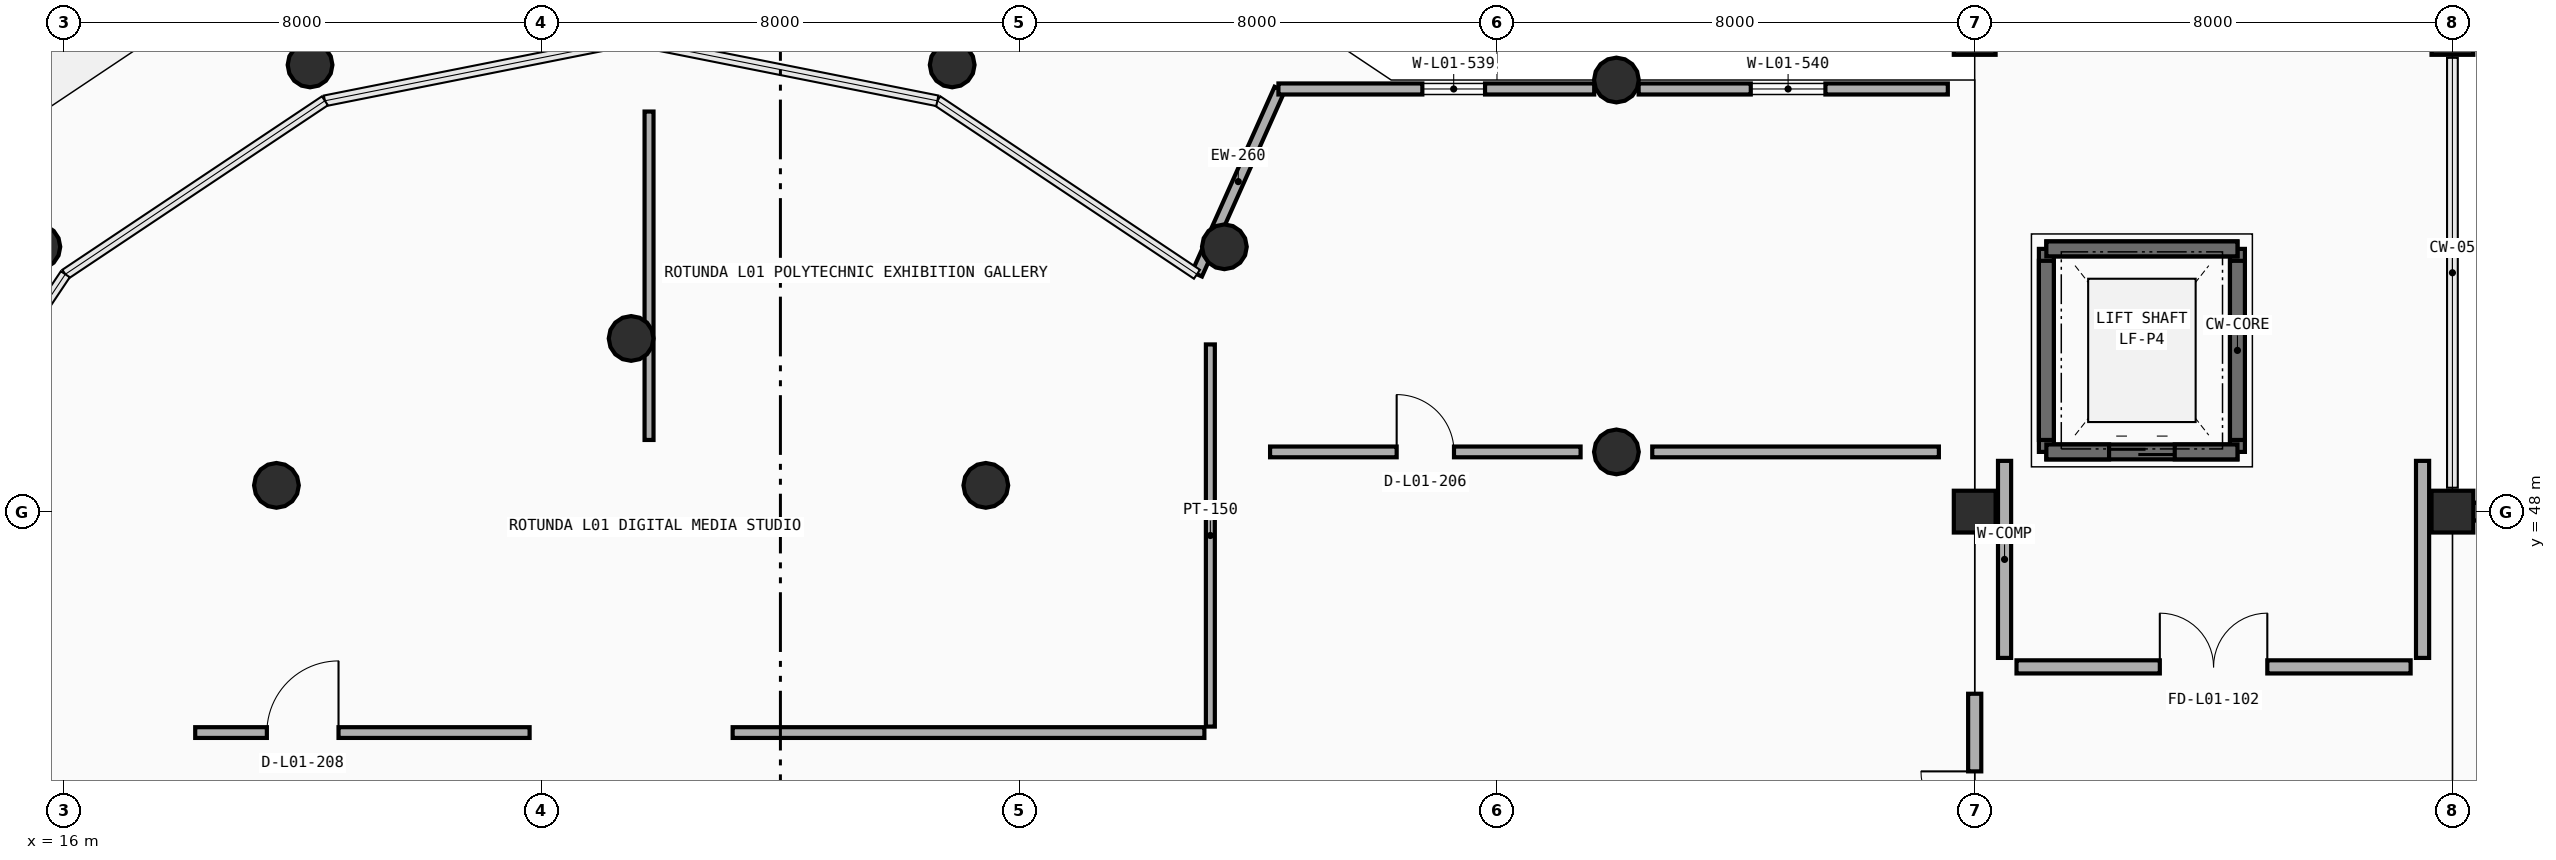
"""IFC4 building model, lengths in metres.
Left out: names, types, materials, properties, quantities, classifications, styles, units other than length and angle.
Written with IfcOpenShell. Run it as: python <this file> out.ifc"""

import sys

from ifc_helpers import new_model, si_unit, direction, frame, frame_2d, origin, origin_2d, place, context, subcontext, project, spatial, rectangle, circle, extrude, element, fill, save


model = new_model("IFC4")
c1 = context("Model", 3, precision=1e-05, world=origin(), true_north=direction((0.0, 1.0)))
c2 = subcontext(c1, "Body", "Model", "MODEL_VIEW")
j1 = project(units=[si_unit("LENGTHUNIT", "METRE"), si_unit("PLANEANGLEUNIT", "RADIAN")], contexts=[c1])
p1 = place(None, origin())
s1 = spatial("IfcSite", under=j1, at=p1, CompositionType="ELEMENT")
p2 = place(p1, origin())
s2 = spatial("IfcBuilding", under=s1, at=p2, CompositionType="ELEMENT")
p3 = place(p2, origin())
s3 = spatial("IfcBuildingStorey", under=s2, at=p3, CompositionType="ELEMENT", Elevation=0.0)
for number, where, z_axis, x_axis in (
    (1, (48.0, 48.0, 0.0), (0.0, 0.0, 1.0), (1.0, 0.0, 0.0)),
    (2, (56.0, 48.0, 0.0), (0.0, 0.0, 1.0), (1.0, 0.0, 0.0)),
):
    element("IfcColumn", number, at=place(p3, frame(where, z_axis=z_axis, x_axis=x_axis)), inside=s3, PredefinedType="COLUMN", context=c2, shape_type="SweptSolid", body=[
        extrude(rectangle(XDim=0.7, YDim=0.7, at=origin_2d()), origin(), (0.0, 0.0, 1.0), 4.8),
    ])
for number, where, z_axis, x_axis in (
    (3, (19.56, 48.44, 0.0), (0.0, 0.0, 1.0), (1.0, 0.0, 0.0)),
    (4, (31.44, 48.44, 0.0), (0.0, 0.0, 1.0), (1.0, 0.0, 0.0)),
    (5, (42.0, 49.0, 0.0), (0.0, 0.0, 1.0), (1.0, 0.0, 0.0)),
    (6, (25.5, 50.9, 0.0), (0.0, 0.0, 1.0), (1.0, 0.0, 0.0)),
    (7, (15.565, 52.435, 0.0), (0.0, 0.0, 1.0), (1.0, 0.0, 0.0)),
    (8, (35.435, 52.435, 0.0), (0.0, 0.0, 1.0), (1.0, 0.0, 0.0)),
    (9, (42.0, 55.228, 0.0), (0.0, 0.0, 1.0), (1.0, 0.0, 0.0)),
    (10, (20.123, 55.48, 0.0), (0.0, 0.0, 1.0), (1.0, 0.0, 0.0)),
    (11, (30.877, 55.48, 0.0), (0.0, 0.0, 1.0), (1.0, 0.0, 0.0)),
):
    element("IfcColumn", number, at=place(p3, frame(where, z_axis=z_axis, x_axis=x_axis)), inside=s3, PredefinedType="COLUMN", context=c2, shape_type="SweptSolid", body=[
        extrude(circle(Radius=0.375, at=origin_2d()), origin(), (0.0, 0.0, 1.0), 4.8),
    ])
for number, where, z_axis, x_axis in (
    (12, (48.0, 56.0, 0.0), (0.0, 0.0, 1.0), (1.0, 0.0, 0.0)),
    (13, (56.0, 56.0, 0.0), (0.0, 0.0, 1.0), (1.0, 0.0, 0.0)),
):
    element("IfcColumn", number, at=place(p3, frame(where, z_axis=z_axis, x_axis=x_axis)), inside=s3, PredefinedType="COLUMN", context=c2, shape_type="SweptSolid", body=[
        extrude(rectangle(XDim=0.7, YDim=0.7, at=origin_2d()), origin(), (0.0, 0.0, 1.0), 4.8),
    ])
p4 = place(p3, frame((56.347, 48.0, 0.0), z_axis=(0.0, 0.0, 1.0), x_axis=(1.0, 0.0, 0.0)))
e14 = element("IfcWall", 14, at=p4, inside=s3, PredefinedType="STANDARD", context=c2, shape_type="SweptSolid", body=[
    extrude(rectangle(XDim=7.306, YDim=0.3, at=frame_2d((3.653, 0.0))), origin(), (0.0, 0.0, 1.0), 3.91),
])
p5 = place(p4, frame((2.233, 0.0, 0.9)))
e15 = element("IfcOpeningElement", 15, at=p5, cuts=e14, PredefinedType="OPENING", context=c2, shape_type="SweptSolid", body=[
    extrude(rectangle(XDim=2.45, YDim=1.4, at=frame_2d((1.225, 0.7))), frame((0.0, 0.16, 0.0), z_axis=(0.0, -1.0, 0.0), x_axis=(1.0, 0.0, 0.0)), (0.0, 0.0, 1.0), 0.32),
])
p6 = place(p3, frame((38.143, 55.143, 0.0), z_axis=(0.0, 0.0, 1.0), x_axis=(-0.831468390799, 0.555572061125, 0.0)))
e16 = element("IfcWall", 16, at=p6, inside=s3, PredefinedType="PARAPET", context=c2, shape_type="SweptSolid", body=[
    extrude(rectangle(XDim=6.977, YDim=0.2, at=frame_2d((3.488, 0.0))), origin(), (0.0, 0.0, 1.0), 1.15),
])
p7 = place(p3, frame((34.975, 51.975, 0.0), z_axis=(0.0, 0.0, 1.0), x_axis=(0.40761125598, 0.913155553013, 0.0)))
e17 = element("IfcWall", 17, at=p7, inside=s3, PredefinedType="STANDARD", context=c2, shape_type="SweptSolid", body=[
    extrude(rectangle(XDim=3.398, YDim=0.185, at=frame_2d((1.699, 0.0))), origin(), (0.0, 0.0, 1.0), 3.95),
])
p8 = place(p3, frame((36.34, 55.078, 0.0), z_axis=(0.0, 0.0, 1.0), x_axis=(1.0, 0.0, 0.0)))
e18 = element("IfcWall", 18, at=p8, inside=s3, PredefinedType="STANDARD", context=c2, shape_type="SweptSolid", body=[
    extrude(rectangle(XDim=5.288, YDim=0.185, at=frame_2d((2.644, 0.0))), origin(), (0.0, 0.0, 1.0), 3.925),
])
p9 = place(p8, frame((2.41, 0.0, 0.9)))
e19 = element("IfcOpeningElement", 19, at=p9, cuts=e18, PredefinedType="OPENING", context=c2, shape_type="SweptSolid", body=[
    extrude(rectangle(XDim=1.05, YDim=1.25, at=frame_2d((0.525, 0.625))), frame((0.0, 0.103, 0.0), z_axis=(0.0, -1.0, 0.0), x_axis=(1.0, 0.0, 0.0)), (0.0, 0.0, 1.0), 0.205),
])
p10 = place(p3, frame((42.372, 55.078, 0.0), z_axis=(0.0, 0.0, 1.0), x_axis=(1.0, 0.0, 0.0)))
e20 = element("IfcWall", 20, at=p10, inside=s3, PredefinedType="STANDARD", context=c2, shape_type="SweptSolid", body=[
    extrude(rectangle(XDim=5.178, YDim=0.185, at=frame_2d((2.589, 0.0))), origin(), (0.0, 0.0, 1.0), 3.925),
])
p11 = place(p10, frame((1.878, 0.0, 0.9)))
e21 = element("IfcOpeningElement", 21, at=p11, cuts=e20, PredefinedType="OPENING", context=c2, shape_type="SweptSolid", body=[
    extrude(rectangle(XDim=1.25, YDim=1.25, at=frame_2d((0.625, 0.625))), frame((0.0, 0.103, 0.0), z_axis=(0.0, -1.0, 0.0), x_axis=(1.0, 0.0, 0.0)), (0.0, 0.0, 1.0), 0.205),
])
p12 = place(p3, frame((12.878, 55.122, 3.37), z_axis=(0.0, 0.0, 1.0), x_axis=(0.831472806966, 0.555565451838, 0.0)))
e22 = element("IfcWall", 22, at=p12, inside=s3, PredefinedType="PARAPET", context=c2, shape_type="SweptSolid", body=[
    extrude(rectangle(XDim=6.965, YDim=0.2, at=frame_2d((3.482, 0.0))), origin(), (0.0, 0.0, 1.0), 1.62),
])
p13 = place(p3, frame((14.39, 53.832, 3.37), z_axis=(0.0, 0.0, 1.0), x_axis=(0.831462553548, 0.555580797046, 0.0)))
e23 = element("IfcWall", 23, at=p13, inside=s3, PredefinedType="PARAPET", context=c2, shape_type="SweptSolid", body=[
    extrude(rectangle(XDim=5.884, YDim=0.18, at=frame_2d((2.942, 0.0))), origin(), (0.0, 0.0, 1.0), 1.62),
])
p14 = place(p3, frame((49.2, 49.0, -1.5), z_axis=(0.0, 0.0, 1.0), x_axis=(1.0, 0.0, 0.0)))
e24 = element("IfcWall", 24, at=p14, inside=s3, PredefinedType="SOLIDWALL", context=c2, shape_type="SweptSolid", body=[
    extrude(rectangle(XDim=3.2, YDim=0.25, at=frame_2d((1.6, 0.0))), origin(), (0.0, 0.0, 1.0), 1.5),
])
p15 = place(p3, frame((52.4, 49.0, -1.5), z_axis=(0.0, 0.0, 1.0), x_axis=(0.0, 1.0, 0.0)))
e25 = element("IfcWall", 25, at=p15, inside=s3, PredefinedType="SOLIDWALL", context=c2, shape_type="SweptSolid", body=[
    extrude(rectangle(XDim=3.4, YDim=0.25, at=frame_2d((1.7, 0.0))), origin(), (0.0, 0.0, 1.0), 1.5),
])
p16 = place(p3, frame((52.4, 52.4, -1.5), z_axis=(0.0, 0.0, 1.0), x_axis=(-1.0, 0.0, 0.0)))
e26 = element("IfcWall", 26, at=p16, inside=s3, PredefinedType="SOLIDWALL", context=c2, shape_type="SweptSolid", body=[
    extrude(rectangle(XDim=3.2, YDim=0.25, at=frame_2d((1.6, 0.0))), origin(), (0.0, 0.0, 1.0), 1.5),
])
p17 = place(p3, frame((49.2, 52.4, -1.5), z_axis=(0.0, 0.0, 1.0), x_axis=(0.0, -1.0, 0.0)))
e27 = element("IfcWall", 27, at=p17, inside=s3, PredefinedType="SOLIDWALL", context=c2, shape_type="SweptSolid", body=[
    extrude(rectangle(XDim=3.4, YDim=0.25, at=frame_2d((1.7, 0.0))), origin(), (0.0, 0.0, 1.0), 1.5),
])
p18 = place(p3, frame((49.2, 49.0, 0.0), z_axis=(0.0, 0.0, 1.0), x_axis=(1.0, 0.0, 0.0)))
e28 = element("IfcWall", 28, at=p18, inside=s3, PredefinedType="SOLIDWALL", context=c2, shape_type="SweptSolid", body=[
    extrude(rectangle(XDim=3.2, YDim=0.25, at=frame_2d((1.6, 0.0))), origin(), (0.0, 0.0, 1.0), 4.8),
])
p19 = place(p18, frame((1.05, 0.0, 0.0)))
e29 = element("IfcOpeningElement", 29, at=p19, cuts=e28, PredefinedType="OPENING", context=c2, shape_type="SweptSolid", body=[
    extrude(rectangle(XDim=1.1, YDim=2.15, at=frame_2d((0.55, 1.075))), frame((0.0, 0.135, 0.0), z_axis=(0.0, -1.0, 0.0), x_axis=(1.0, 0.0, 0.0)), (0.0, 0.0, 1.0), 0.27),
])
p20 = place(p3, frame((49.2, 52.4, 0.0), z_axis=(0.0, 0.0, 1.0), x_axis=(1.0, 0.0, 0.0)))
e30 = element("IfcWall", 30, at=p20, inside=s3, PredefinedType="SOLIDWALL", context=c2, shape_type="SweptSolid", body=[
    extrude(rectangle(XDim=3.2, YDim=0.25, at=frame_2d((1.6, 0.0))), origin(), (0.0, 0.0, 1.0), 4.8),
])
for number, where, z_axis, x_axis in (
    (31, (49.2, 49.2, 0.0), (0.0, 0.0, 1.0), (0.0, 1.0, 0.0)),
    (32, (52.4, 49.2, 0.0), (0.0, 0.0, 1.0), (0.0, 1.0, 0.0)),
):
    element("IfcWall", number, at=place(p3, frame(where, z_axis=z_axis, x_axis=x_axis)), inside=s3, PredefinedType="SOLIDWALL", context=c2, shape_type="SweptSolid", body=[
        extrude(rectangle(XDim=3.0, YDim=0.25, at=frame_2d((1.5, 0.0))), origin(), (0.0, 0.0, 1.0), 4.8),
    ])
p21 = place(p3, frame((48.7, 45.4, 0.0), z_axis=(0.0, 0.0, 1.0), x_axis=(1.0, 0.0, 0.0)))
e33 = element("IfcWall", 33, at=p21, inside=s3, PredefinedType="PARTITIONING", context=c2, shape_type="SweptSolid", body=[
    extrude(rectangle(XDim=6.6, YDim=0.22, at=frame_2d((3.3, 0.0))), origin(), (0.0, 0.0, 1.0), 3.9),
])
p22 = place(p21, frame((2.4, 0.0, 0.0)))
e34 = element("IfcOpeningElement", 34, at=p22, cuts=e33, PredefinedType="OPENING", context=c2, shape_type="SweptSolid", body=[
    extrude(rectangle(XDim=1.8, YDim=2.2, at=frame_2d((0.9, 1.1))), frame((0.0, 0.12, 0.0), z_axis=(0.0, -1.0, 0.0), x_axis=(1.0, 0.0, 0.0)), (0.0, 0.0, 1.0), 0.24),
])
for number, where, z_axis, x_axis in (
    (35, (48.5, 45.55, 0.0), (0.0, 0.0, 1.0), (0.0, 1.0, 0.0)),
    (36, (55.5, 45.55, 0.0), (0.0, 0.0, 1.0), (0.0, 1.0, 0.0)),
):
    element("IfcWall", number, at=place(p3, frame(where, z_axis=z_axis, x_axis=x_axis)), inside=s3, PredefinedType="PARTITIONING", context=c2, shape_type="SweptSolid", body=[
        extrude(rectangle(XDim=3.3, YDim=0.22, at=frame_2d((1.65, 0.0))), origin(), (0.0, 0.0, 1.0), 3.76),
    ])
p23 = place(p3, frame((42.6, 49.0, 0.0), z_axis=(0.0, 0.0, 1.0), x_axis=(1.0, 0.0, 0.0)))
e37 = element("IfcWall", 37, at=p23, inside=s3, PredefinedType="PARTITIONING", context=c2, shape_type="SweptSolid", body=[
    extrude(rectangle(XDim=4.8, YDim=0.18, at=frame_2d((2.4, 0.0))), origin(), (0.0, 0.0, 1.0), 3.875),
])
p24 = place(p3, frame((25.8, 49.2, 0.0), z_axis=(0.0, 0.0, 1.0), x_axis=(0.0, 1.0, 0.0)))
e38 = element("IfcWall", 38, at=p24, inside=s3, PredefinedType="PARTITIONING", context=c2, shape_type="SweptSolid", body=[
    extrude(rectangle(XDim=5.5, YDim=0.15, at=frame_2d((2.75, 0.0))), origin(), (0.0, 0.0, 1.0), 3.775),
])
p25 = place(p3, frame((36.2, 49.0, 0.0), z_axis=(0.0, 0.0, 1.0), x_axis=(1.0, 0.0, 0.0)))
e39 = element("IfcWall", 39, at=p25, inside=s3, PredefinedType="PARTITIONING", context=c2, shape_type="SweptSolid", body=[
    extrude(rectangle(XDim=5.2, YDim=0.18, at=frame_2d((2.6, 0.0))), origin(), (0.0, 0.0, 1.0), 3.9),
])
p26 = place(p25, frame((2.12, 0.0, 0.0)))
e40 = element("IfcOpeningElement", 40, at=p26, cuts=e39, PredefinedType="OPENING", context=c2, shape_type="SweptSolid", body=[
    extrude(rectangle(XDim=0.96, YDim=2.15, at=frame_2d((0.48, 1.075))), frame((0.0, 0.1, 0.0), z_axis=(0.0, -1.0, 0.0), x_axis=(1.0, 0.0, 0.0)), (0.0, 0.0, 1.0), 0.2),
])
p27 = place(p3, frame((27.2, 44.3, 0.0), z_axis=(0.0, 0.0, 1.0), x_axis=(1.0, 0.0, 0.0)))
e41 = element("IfcWall", 41, at=p27, inside=s3, PredefinedType="PARTITIONING", context=c2, shape_type="SweptSolid", body=[
    extrude(rectangle(XDim=7.9, YDim=0.18, at=frame_2d((3.95, 0.0))), origin(), (0.0, 0.0, 1.0), 3.9),
])
p28 = place(p3, frame((35.2, 44.4, 0.0), z_axis=(0.0, 0.0, 1.0), x_axis=(0.0, 1.0, 0.0)))
e42 = element("IfcWall", 42, at=p28, inside=s3, PredefinedType="PARTITIONING", context=c2, shape_type="SweptSolid", body=[
    extrude(rectangle(XDim=6.4, YDim=0.15, at=frame_2d((3.2, 0.0))), origin(), (0.0, 0.0, 1.0), 3.9),
])
p29 = place(p3, frame((18.2, 44.3, 0.0), z_axis=(0.0, 0.0, 1.0), x_axis=(1.0, 0.0, 0.0)))
e43 = element("IfcWall", 43, at=p29, inside=s3, PredefinedType="PARTITIONING", context=c2, shape_type="SweptSolid", body=[
    extrude(rectangle(XDim=5.6, YDim=0.18, at=frame_2d((2.8, 0.0))), origin(), (0.0, 0.0, 1.0), 3.9),
])
p30 = place(p29, frame((1.2, 0.0, 0.0)))
e44 = element("IfcOpeningElement", 44, at=p30, cuts=e43, PredefinedType="OPENING", context=c2, shape_type="SweptSolid", body=[
    extrude(rectangle(XDim=1.2, YDim=2.2, at=frame_2d((0.6, 1.1))), frame((0.0, 0.1, 0.0), z_axis=(0.0, -1.0, 0.0), x_axis=(1.0, 0.0, 0.0)), (0.0, 0.0, 1.0), 0.2),
])
p31 = place(p3, frame((48.0, 40.55, 0.0), z_axis=(0.0, 0.0, 1.0), x_axis=(0.0, 1.0, 0.0)))
e45 = element("IfcWall", 45, at=p31, inside=s3, PredefinedType="PARTITIONING", context=c2, shape_type="SweptSolid", body=[
    extrude(rectangle(XDim=4.4, YDim=0.22, at=frame_2d((2.2, 0.0))), origin(), (0.0, 0.0, 1.0), 3.76),
])
p32 = place(p31, frame((1.3, 0.0, 0.0)))
e46 = element("IfcOpeningElement", 46, at=p32, cuts=e45, PredefinedType="OPENING", context=c2, shape_type="SweptSolid", body=[
    extrude(rectangle(XDim=1.8, YDim=2.2, at=frame_2d((0.9, 1.1))), frame((0.0, 0.12, 0.0), z_axis=(0.0, -1.0, 0.0), x_axis=(1.0, 0.0, 0.0)), (0.0, 0.0, 1.0), 0.24),
])
p33 = place(p9, origin())
e47 = element("IfcWindow", 47, at=p33, inside=s3, PartitioningType="SINGLE_PANEL", PredefinedType="WINDOW", context=c2, shape_type="SweptSolid", body=[
    extrude(rectangle(XDim=1.05, YDim=1.25, at=frame_2d((0.525, 0.625))), frame((0.0, 0.03, 0.0), z_axis=(0.0, -1.0, 0.0), x_axis=(1.0, 0.0, 0.0)), (0.0, 0.0, 1.0), 0.06),
])
fill(e19, e47)
p34 = place(p11, origin())
e48 = element("IfcWindow", 48, at=p34, inside=s3, PartitioningType="SINGLE_PANEL", PredefinedType="WINDOW", context=c2, shape_type="SweptSolid", body=[
    extrude(rectangle(XDim=1.25, YDim=1.25, at=frame_2d((0.625, 0.625))), frame((0.0, 0.03, 0.0), z_axis=(0.0, -1.0, 0.0), x_axis=(1.0, 0.0, 0.0)), (0.0, 0.0, 1.0), 0.06),
])
fill(e21, e48)
p35 = place(p19, origin())
e49 = element("IfcDoor", 49, at=p35, inside=s3, OperationType="DOUBLE_DOOR_SLIDING", PredefinedType="DOOR", context=c2, shape_type="SweptSolid", body=[
    extrude(rectangle(XDim=1.1, YDim=2.15, at=frame_2d((0.55, 1.075))), frame((0.0, 0.025, 0.0), z_axis=(0.0, -1.0, 0.0), x_axis=(1.0, 0.0, 0.0)), (0.0, 0.0, 1.0), 0.05),
])
fill(e29, e49)
p36 = place(p22, origin())
e50 = element("IfcDoor", 50, at=p36, inside=s3, OperationType="DOUBLE_DOOR_SINGLE_SWING", PredefinedType="DOOR", context=c2, shape_type="SweptSolid", body=[
    extrude(rectangle(XDim=1.8, YDim=2.2, at=frame_2d((0.9, 1.1))), frame((0.0, 0.025, 0.0), z_axis=(0.0, -1.0, 0.0), x_axis=(1.0, 0.0, 0.0)), (0.0, 0.0, 1.0), 0.05),
])
fill(e34, e50)
p37 = place(p26, origin())
e51 = element("IfcDoor", 51, at=p37, inside=s3, OperationType="SINGLE_SWING_LEFT", PredefinedType="DOOR", context=c2, shape_type="SweptSolid", body=[
    extrude(rectangle(XDim=0.96, YDim=2.15, at=frame_2d((0.48, 1.075))), frame((0.0, 0.025, 0.0), z_axis=(0.0, -1.0, 0.0), x_axis=(1.0, 0.0, 0.0)), (0.0, 0.0, 1.0), 0.05),
])
fill(e40, e51)
p38 = place(p30, origin())
e52 = element("IfcDoor", 52, at=p38, inside=s3, OperationType="SINGLE_SWING_RIGHT", PredefinedType="DOOR", context=c2, shape_type="SweptSolid", body=[
    extrude(rectangle(XDim=1.2, YDim=2.2, at=frame_2d((0.6, 1.1))), frame((0.0, 0.025, 0.0), z_axis=(0.0, -1.0, 0.0), x_axis=(1.0, 0.0, 0.0)), (0.0, 0.0, 1.0), 0.05),
])
fill(e44, e52)
p39 = place(p32, origin())
e53 = element("IfcDoor", 53, at=p39, inside=s3, OperationType="DOUBLE_DOOR_SINGLE_SWING", PredefinedType="DOOR", context=c2, shape_type="SweptSolid", body=[
    extrude(rectangle(XDim=1.8, YDim=2.2, at=frame_2d((0.9, 1.1))), frame((0.0, 0.025, 0.0), z_axis=(0.0, -1.0, 0.0), x_axis=(1.0, 0.0, 0.0)), (0.0, 0.0, 1.0), 0.05),
])
fill(e46, e53)
save(model, sys.argv[1])
